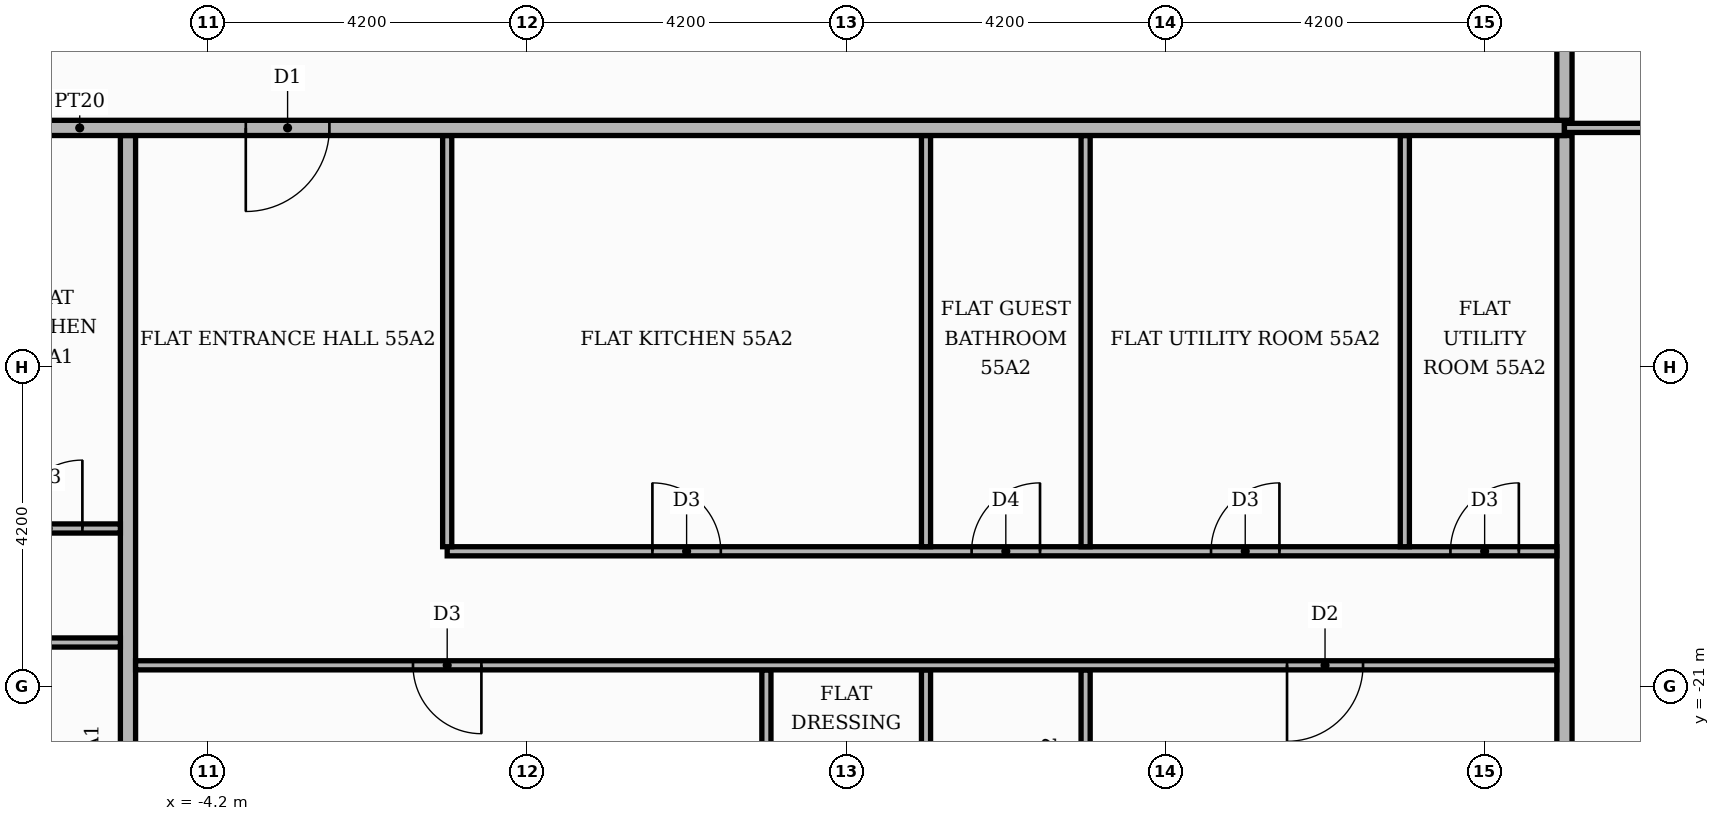
"""IFC4 building model, lengths in metres.
Left out: names, types, materials, properties, quantities, classifications, styles, units other than length and angle.
Written with IfcOpenShell. Run it as: python <this file> out.ifc"""

import sys

from ifc_helpers import new_model, si_unit, direction, frame, frame_2d, origin, place, context, subcontext, project, spatial, rectangle, extrude, element, fill, save


model = new_model("IFC4")
c1 = context("Model", 3, precision=1e-05, world=origin(), true_north=direction((0.0, 1.0)))
c2 = subcontext(c1, "Body", "Model", "MODEL_VIEW")
j1 = project(units=[si_unit("LENGTHUNIT", "METRE"), si_unit("PLANEANGLEUNIT", "RADIAN")], contexts=[c1])
p1 = place(None, origin())
s1 = spatial("IfcSite", under=j1, at=p1, CompositionType="ELEMENT")
p2 = place(p1, origin())
s2 = spatial("IfcBuilding", under=s1, at=p2, CompositionType="ELEMENT")
p3 = place(p2, frame((0.0, 0.0, 231.3)))
s3 = spatial("IfcBuildingStorey", under=s2, at=p3, CompositionType="ELEMENT", Elevation=231.3)
p4 = place(p3, frame((-5.25, -25.42, 0.0), z_axis=(0.0, 0.0, 1.0), x_axis=(0.0, 1.0, 0.0)))
e1 = element("IfcWall", 1, at=p4, inside=s3, PredefinedType="PARTITIONING", context=c2, shape_type="SweptSolid", body=[
    extrude(rectangle(XDim=11.67, YDim=0.2, at=frame_2d((5.835, 0.0))), origin(), (0.0, 0.0, 1.0), 3.4),
])
p5 = place(p3, frame((3.15, -25.42, 0.0), z_axis=(0.0, 0.0, 1.0), x_axis=(0.0, 1.0, 0.0)))
e2 = element("IfcWall", 2, at=p5, inside=s3, PredefinedType="PARTITIONING", context=c2, shape_type="SweptSolid", body=[
    extrude(rectangle(XDim=4.64, YDim=0.12, at=frame_2d((2.32, 0.0))), origin(), (0.0, 0.0, 1.0), 3.4),
])
p6 = place(p5, frame((1.75, 0.0, 0.0)))
e3 = element("IfcOpeningElement", 3, at=p6, cuts=e2, PredefinedType="OPENING", context=c2, shape_type="SweptSolid", body=[
    extrude(rectangle(XDim=0.9, YDim=2.1, at=frame_2d((0.45, 1.05))), frame((0.0, 0.07, 0.0), z_axis=(0.0, -1.0, 0.0), x_axis=(1.0, 0.0, 0.0)), (0.0, 0.0, 1.0), 0.14),
])
p7 = place(p3, frame((5.25, -25.42, 0.0), z_axis=(0.0, 0.0, 1.0), x_axis=(0.0, 1.0, 0.0)))
e4 = element("IfcWall", 4, at=p7, inside=s3, PredefinedType="PARTITIONING", context=c2, shape_type="SweptSolid", body=[
    extrude(rectangle(XDim=4.64, YDim=0.12, at=frame_2d((2.32, 0.0))), origin(), (0.0, 0.0, 1.0), 3.4),
])
p8 = place(p7, frame((1.75, 0.0, 0.0)))
e5 = element("IfcOpeningElement", 5, at=p8, cuts=e4, PredefinedType="OPENING", context=c2, shape_type="SweptSolid", body=[
    extrude(rectangle(XDim=0.9, YDim=2.1, at=frame_2d((0.45, 1.05))), frame((0.0, 0.07, 0.0), z_axis=(0.0, -1.0, 0.0), x_axis=(1.0, 0.0, 0.0)), (0.0, 0.0, 1.0), 0.14),
])
p9 = place(p3, frame((7.35, -25.42, 0.0), z_axis=(0.0, 0.0, 1.0), x_axis=(0.0, 1.0, 0.0)))
e6 = element("IfcWall", 6, at=p9, inside=s3, PredefinedType="PARTITIONING", context=c2, shape_type="SweptSolid", body=[
    extrude(rectangle(XDim=4.64, YDim=0.12, at=frame_2d((2.32, 0.0))), origin(), (0.0, 0.0, 1.0), 3.4),
])
p10 = place(p3, frame((13.65, -25.42, 0.0), z_axis=(0.0, 0.0, 1.0), x_axis=(0.0, 1.0, 0.0)))
e7 = element("IfcWall", 7, at=p10, inside=s3, PredefinedType="PARTITIONING", context=c2, shape_type="SweptSolid", body=[
    extrude(rectangle(XDim=11.67, YDim=0.2, at=frame_2d((5.835, 0.0))), origin(), (0.0, 0.0, 1.0), 3.4),
])
p11 = place(p3, frame((-5.15, -20.72, 0.0), z_axis=(0.0, 0.0, 1.0), x_axis=(1.0, 0.0, 0.0)))
e8 = element("IfcWall", 8, at=p11, inside=s3, PredefinedType="PARTITIONING", context=c2, shape_type="SweptSolid", body=[
    extrude(rectangle(XDim=18.7, YDim=0.12, at=frame_2d((9.35, 0.0))), origin(), (0.0, 0.0, 1.0), 3.4),
])
p12 = place(p11, frame((3.65, 0.0, 0.0)))
e9 = element("IfcOpeningElement", 9, at=p12, cuts=e8, PredefinedType="OPENING", context=c2, shape_type="SweptSolid", body=[
    extrude(rectangle(XDim=0.9, YDim=2.1, at=frame_2d((0.45, 1.05))), frame((0.0, 0.07, 0.0), z_axis=(0.0, -1.0, 0.0), x_axis=(1.0, 0.0, 0.0)), (0.0, 0.0, 1.0), 0.14),
])
p13 = place(p11, frame((15.15, 0.0, 0.0)))
e10 = element("IfcOpeningElement", 10, at=p13, cuts=e8, PredefinedType="OPENING", context=c2, shape_type="SweptSolid", body=[
    extrude(rectangle(XDim=1.0, YDim=2.1, at=frame_2d((0.5, 1.05))), frame((0.0, 0.07, 0.0), z_axis=(0.0, -1.0, 0.0), x_axis=(1.0, 0.0, 0.0)), (0.0, 0.0, 1.0), 0.14),
])
p14 = place(p3, frame((-21.219, -20.42, 0.0), z_axis=(0.0, 0.0, 1.0), x_axis=(1.0, 0.0, 0.0)))
e11 = element("IfcWall", 11, at=p14, inside=s3, PredefinedType="PARTITIONING", context=c2, shape_type="SweptSolid", body=[
    extrude(rectangle(XDim=15.869, YDim=0.12, at=frame_2d((7.935, 0.0))), origin(), (0.0, 0.0, 1.0), 3.4),
])
p15 = place(p14, frame((6.019, 0.0, 0.0)))
e12 = element("IfcOpeningElement", 12, at=p15, cuts=e11, PredefinedType="OPENING", context=c2, shape_type="SweptSolid", body=[
    extrude(rectangle(XDim=1.0, YDim=2.1, at=frame_2d((0.5, 1.05))), frame((0.0, 0.07, 0.0), z_axis=(0.0, -1.0, 0.0), x_axis=(1.0, 0.0, 0.0)), (0.0, 0.0, 1.0), 0.14),
])
p16 = place(p14, frame((9.219, 0.0, 0.0)))
e13 = element("IfcOpeningElement", 13, at=p16, cuts=e11, PredefinedType="OPENING", context=c2, shape_type="SweptSolid", body=[
    extrude(rectangle(XDim=0.9, YDim=2.1, at=frame_2d((0.45, 1.05))), frame((0.0, 0.07, 0.0), z_axis=(0.0, -1.0, 0.0), x_axis=(1.0, 0.0, 0.0)), (0.0, 0.0, 1.0), 0.14),
])
p17 = place(p3, frame((-1.05, -19.22, 0.0), z_axis=(0.0, 0.0, 1.0), x_axis=(1.0, 0.0, 0.0)))
e14 = element("IfcWall", 14, at=p17, inside=s3, PredefinedType="PARTITIONING", context=c2, shape_type="SweptSolid", body=[
    extrude(rectangle(XDim=14.6, YDim=0.12, at=frame_2d((7.3, 0.0))), origin(), (0.0, 0.0, 1.0), 3.4),
])
p18 = place(p17, frame((2.7, 0.0, 0.0)))
e15 = element("IfcOpeningElement", 15, at=p18, cuts=e14, PredefinedType="OPENING", context=c2, shape_type="SweptSolid", body=[
    extrude(rectangle(XDim=0.9, YDim=2.1, at=frame_2d((0.45, 1.05))), frame((0.0, 0.07, 0.0), z_axis=(0.0, -1.0, 0.0), x_axis=(1.0, 0.0, 0.0)), (0.0, 0.0, 1.0), 0.14),
])
p19 = place(p17, frame((6.9, 0.0, 0.0)))
e16 = element("IfcOpeningElement", 16, at=p19, cuts=e14, PredefinedType="OPENING", context=c2, shape_type="SweptSolid", body=[
    extrude(rectangle(XDim=0.9, YDim=2.1, at=frame_2d((0.45, 1.05))), frame((0.0, 0.07, 0.0), z_axis=(0.0, -1.0, 0.0), x_axis=(1.0, 0.0, 0.0)), (0.0, 0.0, 1.0), 0.14),
])
p20 = place(p17, frame((10.05, 0.0, 0.0)))
e17 = element("IfcOpeningElement", 17, at=p20, cuts=e14, PredefinedType="OPENING", context=c2, shape_type="SweptSolid", body=[
    extrude(rectangle(XDim=0.9, YDim=2.1, at=frame_2d((0.45, 1.05))), frame((0.0, 0.07, 0.0), z_axis=(0.0, -1.0, 0.0), x_axis=(1.0, 0.0, 0.0)), (0.0, 0.0, 1.0), 0.14),
])
p21 = place(p17, frame((13.2, 0.0, 0.0)))
e18 = element("IfcOpeningElement", 18, at=p21, cuts=e14, PredefinedType="OPENING", context=c2, shape_type="SweptSolid", body=[
    extrude(rectangle(XDim=0.9, YDim=2.1, at=frame_2d((0.45, 1.05))), frame((0.0, 0.07, 0.0), z_axis=(0.0, -1.0, 0.0), x_axis=(1.0, 0.0, 0.0)), (0.0, 0.0, 1.0), 0.14),
])
for number, where, z_axis, x_axis in (
    (19, (-1.05, -19.16, 0.0), (0.0, 0.0, 1.0), (0.0, 1.0, 0.0)),
    (20, (5.25, -19.16, 0.0), (0.0, 0.0, 1.0), (0.0, 1.0, 0.0)),
    (21, (7.35, -19.16, 0.0), (0.0, 0.0, 1.0), (0.0, 1.0, 0.0)),
    (22, (11.55, -19.16, 0.0), (0.0, 0.0, 1.0), (0.0, 1.0, 0.0)),
):
    element("IfcWall", number, at=place(p3, frame(where, z_axis=z_axis, x_axis=x_axis)), inside=s3, PredefinedType="PARTITIONING", context=c2, shape_type="SweptSolid", body=[
        extrude(rectangle(XDim=5.41, YDim=0.12, at=frame_2d((2.705, 0.0))), origin(), (0.0, 0.0, 1.0), 3.4),
    ])
p22 = place(p3, frame((-9.45, -18.92, 0.0), z_axis=(0.0, 0.0, 1.0), x_axis=(1.0, 0.0, 0.0)))
e23 = element("IfcWall", 23, at=p22, inside=s3, PredefinedType="PARTITIONING", context=c2, shape_type="SweptSolid", body=[
    extrude(rectangle(XDim=4.1, YDim=0.12, at=frame_2d((2.05, 0.0))), origin(), (0.0, 0.0, 1.0), 3.4),
])
p23 = place(p22, frame((2.7, 0.0, 0.0)))
e24 = element("IfcOpeningElement", 24, at=p23, cuts=e23, PredefinedType="OPENING", context=c2, shape_type="SweptSolid", body=[
    extrude(rectangle(XDim=0.9, YDim=2.1, at=frame_2d((0.45, 1.05))), frame((0.0, 0.07, 0.0), z_axis=(0.0, -1.0, 0.0), x_axis=(1.0, 0.0, 0.0)), (0.0, 0.0, 1.0), 0.14),
])
p24 = place(p3, frame((-25.42, -13.65, 0.0), z_axis=(0.0, 0.0, 1.0), x_axis=(1.0, 0.0, 0.0)))
e25 = element("IfcWall", 25, at=p24, inside=s3, PredefinedType="PARTITIONING", context=c2, shape_type="SweptSolid", body=[
    extrude(rectangle(XDim=39.07, YDim=0.2, at=frame_2d((19.535, 0.0))), origin(), (0.0, 0.0, 1.0), 3.4),
])
p25 = place(p24, frame((13.32, 0.0, 0.0)))
e26 = element("IfcOpeningElement", 26, at=p25, cuts=e25, PredefinedType="OPENING", context=c2, shape_type="SweptSolid", body=[
    extrude(rectangle(XDim=1.1, YDim=2.4, at=frame_2d((0.55, 1.2))), frame((0.0, 0.11, 0.0), z_axis=(0.0, -1.0, 0.0), x_axis=(1.0, 0.0, 0.0)), (0.0, 0.0, 1.0), 0.22),
])
p26 = place(p24, frame((21.72, 0.0, 0.0)))
e27 = element("IfcOpeningElement", 27, at=p26, cuts=e25, PredefinedType="OPENING", context=c2, shape_type="SweptSolid", body=[
    extrude(rectangle(XDim=1.1, YDim=2.4, at=frame_2d((0.55, 1.2))), frame((0.0, 0.11, 0.0), z_axis=(0.0, -1.0, 0.0), x_axis=(1.0, 0.0, 0.0)), (0.0, 0.0, 1.0), 0.22),
])
p27 = place(p3, frame((13.65, -13.65, 0.0), z_axis=(0.0, 0.0, 1.0), x_axis=(1.0, 0.0, 0.0)))
e28 = element("IfcWall", 28, at=p27, inside=s3, PredefinedType="PARTITIONING", context=c2, shape_type="SweptSolid", body=[
    extrude(rectangle(XDim=6.769, YDim=0.12, at=frame_2d((3.385, 0.0))), origin(), (0.0, 0.0, 1.0), 3.4),
])
p28 = place(p27, frame((2.885, 0.0, 0.0)))
e29 = element("IfcOpeningElement", 29, at=p28, cuts=e28, PredefinedType="OPENING", context=c2, shape_type="SweptSolid", body=[
    extrude(rectangle(XDim=1.0, YDim=2.1, at=frame_2d((0.5, 1.05))), frame((0.0, 0.07, 0.0), z_axis=(0.0, -1.0, 0.0), x_axis=(1.0, 0.0, 0.0)), (0.0, 0.0, 1.0), 0.14),
])
p29 = place(p3, frame((13.65, -13.55, 0.0), z_axis=(0.0, 0.0, 1.0), x_axis=(0.0, 1.0, 0.0)))
e30 = element("IfcWall", 30, at=p29, inside=s3, PredefinedType="PARTITIONING", context=c2, shape_type="SweptSolid", body=[
    extrude(rectangle(XDim=2.45, YDim=0.2, at=frame_2d((1.225, 0.0))), origin(), (0.0, 0.0, 1.0), 3.4),
])
p30 = place(p23, origin())
e31 = element("IfcDoor", 31, at=p30, inside=s3, OperationType="SINGLE_SWING_RIGHT", PredefinedType="DOOR", context=c2, shape_type="SweptSolid", body=[
    extrude(rectangle(XDim=0.9, YDim=2.1, at=frame_2d((0.45, 1.05))), frame((0.0, 0.025, 0.0), z_axis=(0.0, -1.0, 0.0), x_axis=(1.0, 0.0, 0.0)), (0.0, 0.0, 1.0), 0.05),
])
fill(e24, e31)
p31 = place(p26, frame((1.1, 0.0, 0.0), z_axis=(0.0, 0.0, 1.0), x_axis=(-1.0, 0.0, 0.0)))
e32 = element("IfcDoor", 32, at=p31, inside=s3, OperationType="SINGLE_SWING_LEFT", PredefinedType="DOOR", context=c2, shape_type="SweptSolid", body=[
    extrude(rectangle(XDim=1.1, YDim=2.4, at=frame_2d((0.55, 1.2))), frame((0.0, 0.025, 0.0), z_axis=(0.0, -1.0, 0.0), x_axis=(1.0, 0.0, 0.0)), (0.0, 0.0, 1.0), 0.05),
])
fill(e27, e32)
p32 = place(p18, origin())
e33 = element("IfcDoor", 33, at=p32, inside=s3, OperationType="SINGLE_SWING_LEFT", PredefinedType="DOOR", context=c2, shape_type="SweptSolid", body=[
    extrude(rectangle(XDim=0.9, YDim=2.1, at=frame_2d((0.45, 1.05))), frame((0.0, 0.025, 0.0), z_axis=(0.0, -1.0, 0.0), x_axis=(1.0, 0.0, 0.0)), (0.0, 0.0, 1.0), 0.05),
])
fill(e15, e33)
p33 = place(p19, origin())
e34 = element("IfcDoor", 34, at=p33, inside=s3, OperationType="SINGLE_SWING_RIGHT", PredefinedType="DOOR", context=c2, shape_type="SweptSolid", body=[
    extrude(rectangle(XDim=0.9, YDim=2.1, at=frame_2d((0.45, 1.05))), frame((0.0, 0.025, 0.0), z_axis=(0.0, -1.0, 0.0), x_axis=(1.0, 0.0, 0.0)), (0.0, 0.0, 1.0), 0.05),
])
fill(e16, e34)
p34 = place(p20, origin())
e35 = element("IfcDoor", 35, at=p34, inside=s3, OperationType="SINGLE_SWING_RIGHT", PredefinedType="DOOR", context=c2, shape_type="SweptSolid", body=[
    extrude(rectangle(XDim=0.9, YDim=2.1, at=frame_2d((0.45, 1.05))), frame((0.0, 0.025, 0.0), z_axis=(0.0, -1.0, 0.0), x_axis=(1.0, 0.0, 0.0)), (0.0, 0.0, 1.0), 0.05),
])
fill(e17, e35)
p35 = place(p21, origin())
e36 = element("IfcDoor", 36, at=p35, inside=s3, OperationType="SINGLE_SWING_RIGHT", PredefinedType="DOOR", context=c2, shape_type="SweptSolid", body=[
    extrude(rectangle(XDim=0.9, YDim=2.1, at=frame_2d((0.45, 1.05))), frame((0.0, 0.025, 0.0), z_axis=(0.0, -1.0, 0.0), x_axis=(1.0, 0.0, 0.0)), (0.0, 0.0, 1.0), 0.05),
])
fill(e18, e36)
p36 = place(p12, frame((0.9, 0.0, 0.0), z_axis=(0.0, 0.0, 1.0), x_axis=(-1.0, 0.0, 0.0)))
e37 = element("IfcDoor", 37, at=p36, inside=s3, OperationType="SINGLE_SWING_RIGHT", PredefinedType="DOOR", context=c2, shape_type="SweptSolid", body=[
    extrude(rectangle(XDim=0.9, YDim=2.1, at=frame_2d((0.45, 1.05))), frame((0.0, 0.025, 0.0), z_axis=(0.0, -1.0, 0.0), x_axis=(1.0, 0.0, 0.0)), (0.0, 0.0, 1.0), 0.05),
])
fill(e9, e37)
p37 = place(p13, frame((1.0, 0.0, 0.0), z_axis=(0.0, 0.0, 1.0), x_axis=(-1.0, 0.0, 0.0)))
e38 = element("IfcDoor", 38, at=p37, inside=s3, OperationType="SINGLE_SWING_LEFT", PredefinedType="DOOR", context=c2, shape_type="SweptSolid", body=[
    extrude(rectangle(XDim=1.0, YDim=2.1, at=frame_2d((0.5, 1.05))), frame((0.0, 0.025, 0.0), z_axis=(0.0, -1.0, 0.0), x_axis=(1.0, 0.0, 0.0)), (0.0, 0.0, 1.0), 0.05),
])
fill(e10, e38)
save(model, sys.argv[1])
